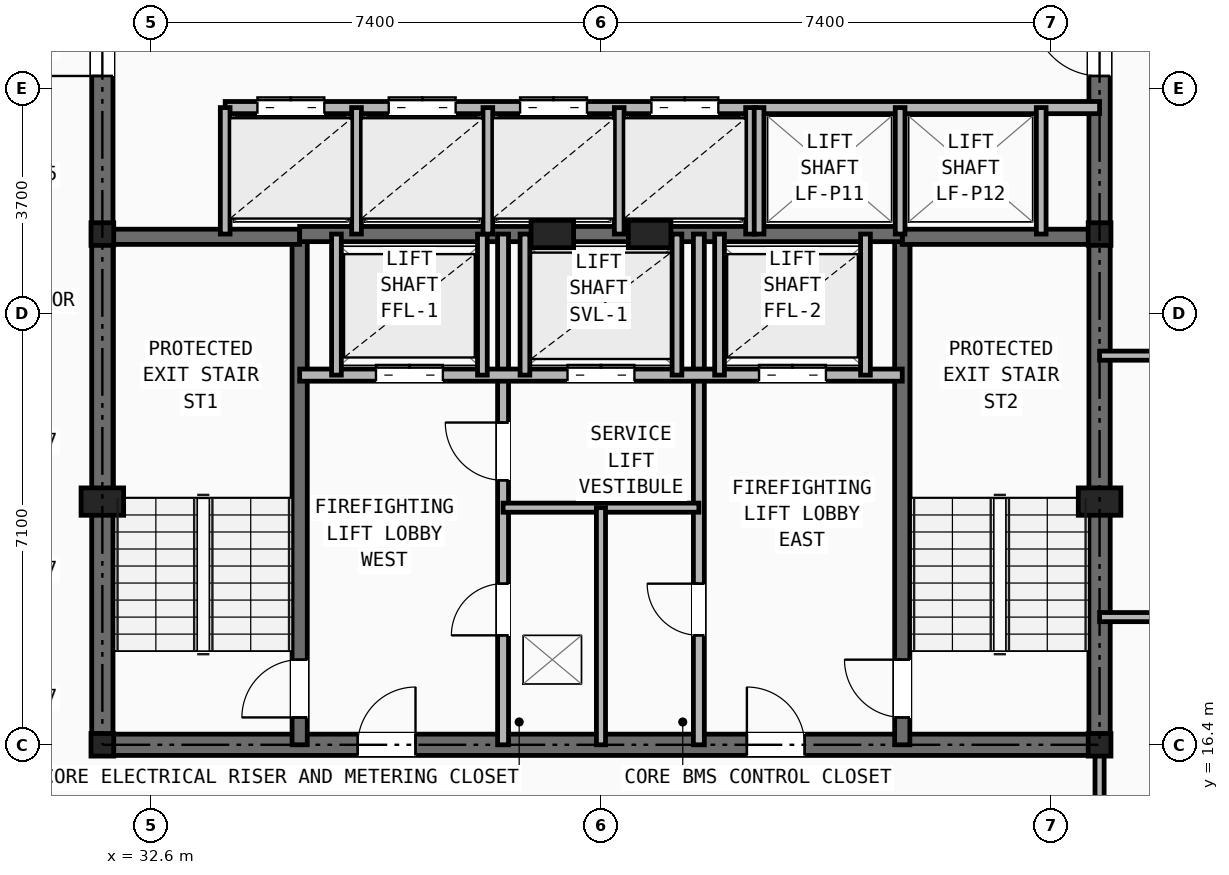
"""IFC4 building model, lengths in metres.
Left out: names, types, materials, properties, quantities, classifications, styles, units other than length and angle.
Written with IfcOpenShell. Run it as: python <this file> out.ifc"""

import sys

from ifc_helpers import new_model, si_unit, direction, frame, frame_2d, origin, origin_2d, place, context, subcontext, project, spatial, rectangle, i_section, extrude, element, fill, save


model = new_model("IFC4")
c1 = context("Model", 3, precision=1e-05, world=origin(), true_north=direction((0.0, 1.0)))
c2 = subcontext(c1, "Body", "Model", "MODEL_VIEW")
j1 = project(units=[si_unit("LENGTHUNIT", "METRE"), si_unit("PLANEANGLEUNIT", "RADIAN")], contexts=[c1])
p1 = place(None, origin())
s1 = spatial("IfcSite", under=j1, at=p1, CompositionType="ELEMENT")
p2 = place(p1, origin())
s2 = spatial("IfcBuilding", under=s1, at=p2, CompositionType="ELEMENT")
p3 = place(p2, frame((0.0, 0.0, 162.0)))
s3 = spatial("IfcBuildingStorey", under=s2, at=p3, CompositionType="ELEMENT", Elevation=162.0)
for number, where, z_axis, x_axis in (
    (1, (31.8, 16.4, 0.0), (0.0, 0.0, 1.0), (1.0, 0.0, 0.0)),
    (2, (48.2, 16.4, 0.0), (0.0, 0.0, 1.0), (1.0, 0.0, 0.0)),
    (3, (31.8, 24.8, 0.0), (0.0, 0.0, 1.0), (1.0, 0.0, 0.0)),
    (4, (48.2, 24.8, 0.0), (0.0, 0.0, 1.0), (1.0, 0.0, 0.0)),
):
    element("IfcColumn", number, at=place(p3, frame(where, z_axis=z_axis, x_axis=x_axis)), inside=s3, PredefinedType="COLUMN", context=c2, shape_type="SweptSolid", body=[
        extrude(i_section(OverallWidth=0.374, OverallDepth=0.372, WebThickness=0.016, FlangeThickness=0.026, at=origin_2d()), origin(), (0.0, 0.0, 1.0), 3.45),
    ])
for number, where, z_axis, x_axis in (
    (5, (31.8, 20.4, 0.0), (0.0, 0.0, 1.0), (1.0, 0.0, 0.0)),
    (6, (48.2, 20.4, 0.0), (0.0, 0.0, 1.0), (1.0, 0.0, 0.0)),
    (7, (39.2, 24.8, 0.0), (0.0, 0.0, 1.0), (1.0, 0.0, 0.0)),
    (8, (40.8, 24.8, 0.0), (0.0, 0.0, 1.0), (1.0, 0.0, 0.0)),
):
    element("IfcColumn", number, at=place(p3, frame(where, z_axis=z_axis, x_axis=x_axis)), inside=s3, PredefinedType="PILASTER", context=c2, shape_type="SweptSolid", body=[
        extrude(rectangle(XDim=0.7, YDim=0.45, at=origin_2d()), origin(), (0.0, 0.0, 1.0), 3.45),
    ])
p4 = place(p3, frame((31.8, 16.4, 0.0), z_axis=(0.0, 0.0, 1.0), x_axis=(1.0, 0.0, 0.0)))
e9 = element("IfcWall", 9, at=p4, inside=s3, PredefinedType="SHEAR", context=c2, shape_type="SweptSolid", body=[
    extrude(rectangle(XDim=16.4, YDim=0.35, at=frame_2d((8.2, 0.0))), origin(), (0.0, 0.0, 1.0), 3.21),
])
p5 = place(p4, frame((4.2, 0.0, 0.0)))
e10 = element("IfcOpeningElement", 10, at=p5, cuts=e9, PredefinedType="OPENING", context=c2, shape_type="SweptSolid", body=[
    extrude(rectangle(XDim=0.95, YDim=2.1, at=frame_2d((0.475, 1.05))), frame((0.0, 0.185, 0.0), z_axis=(0.0, -1.0, 0.0), x_axis=(1.0, 0.0, 0.0)), (0.0, 0.0, 1.0), 0.37),
])
p6 = place(p4, frame((10.6, 0.0, 0.0)))
e11 = element("IfcOpeningElement", 11, at=p6, cuts=e9, PredefinedType="OPENING", context=c2, shape_type="SweptSolid", body=[
    extrude(rectangle(XDim=0.95, YDim=2.1, at=frame_2d((0.475, 1.05))), frame((0.0, 0.185, 0.0), z_axis=(0.0, -1.0, 0.0), x_axis=(1.0, 0.0, 0.0)), (0.0, 0.0, 1.0), 0.37),
])
p7 = place(p3, frame((31.8, 16.4, 0.0), z_axis=(0.0, 0.0, 1.0), x_axis=(0.0, 1.0, 0.0)))
e12 = element("IfcWall", 12, at=p7, inside=s3, PredefinedType="SHEAR", context=c2, shape_type="SweptSolid", body=[
    extrude(rectangle(XDim=14.8, YDim=0.35, at=frame_2d((7.4, 0.0))), origin(), (0.0, 0.0, 1.0), 3.21),
])
p8 = place(p7, frame((11.0, 0.0, 0.0)))
e13 = element("IfcOpeningElement", 13, at=p8, cuts=e12, PredefinedType="OPENING", context=c2, shape_type="SweptSolid", body=[
    extrude(rectangle(XDim=1.1, YDim=2.15, at=frame_2d((0.55, 1.075))), frame((0.0, 0.185, 0.0), z_axis=(0.0, -1.0, 0.0), x_axis=(1.0, 0.0, 0.0)), (0.0, 0.0, 1.0), 0.37),
])
p9 = place(p3, frame((48.2, 16.4, 0.0), z_axis=(0.0, 0.0, 1.0), x_axis=(0.0, 1.0, 0.0)))
e14 = element("IfcWall", 14, at=p9, inside=s3, PredefinedType="SHEAR", context=c2, shape_type="SweptSolid", body=[
    extrude(rectangle(XDim=14.8, YDim=0.35, at=frame_2d((7.4, 0.0))), origin(), (0.0, 0.0, 1.0), 3.21),
])
p10 = place(p9, frame((11.0, 0.0, 0.0)))
e15 = element("IfcOpeningElement", 15, at=p10, cuts=e14, PredefinedType="OPENING", context=c2, shape_type="SweptSolid", body=[
    extrude(rectangle(XDim=1.1, YDim=2.15, at=frame_2d((0.55, 1.075))), frame((0.0, 0.185, 0.0), z_axis=(0.0, -1.0, 0.0), x_axis=(1.0, 0.0, 0.0)), (0.0, 0.0, 1.0), 0.37),
])
p11 = place(p3, frame((35.045, 16.4, 0.0), z_axis=(0.0, 0.0, 1.0), x_axis=(0.0, 1.0, 0.0)))
e16 = element("IfcWall", 16, at=p11, inside=s3, PredefinedType="SHEAR", context=c2, shape_type="SweptSolid", body=[
    extrude(rectangle(XDim=8.4, YDim=0.25, at=frame_2d((4.2, 0.0))), origin(), (0.0, 0.0, 1.0), 3.21),
])
p12 = place(p11, frame((0.45, 0.0, 0.0)))
e17 = element("IfcOpeningElement", 17, at=p12, cuts=e16, PredefinedType="OPENING", context=c2, shape_type="SweptSolid", body=[
    extrude(rectangle(XDim=0.95, YDim=2.1, at=frame_2d((0.475, 1.05))), frame((0.0, 0.135, 0.0), z_axis=(0.0, -1.0, 0.0), x_axis=(1.0, 0.0, 0.0)), (0.0, 0.0, 1.0), 0.27),
])
p13 = place(p3, frame((31.8, 24.755, 0.0), z_axis=(0.0, 0.0, 1.0), x_axis=(1.0, 0.0, 0.0)))
e18 = element("IfcWall", 18, at=p13, inside=s3, PredefinedType="SHEAR", context=c2, shape_type="SweptSolid", body=[
    extrude(rectangle(XDim=3.245, YDim=0.25, at=frame_2d((1.623, 0.0))), origin(), (0.0, 0.0, 1.0), 3.21),
])
p14 = place(p3, frame((44.955, 16.4, 0.0), z_axis=(0.0, 0.0, 1.0), x_axis=(0.0, 1.0, 0.0)))
e19 = element("IfcWall", 19, at=p14, inside=s3, PredefinedType="SHEAR", context=c2, shape_type="SweptSolid", body=[
    extrude(rectangle(XDim=8.4, YDim=0.25, at=frame_2d((4.2, 0.0))), origin(), (0.0, 0.0, 1.0), 3.21),
])
p15 = place(p14, frame((0.45, 0.0, 0.0)))
e20 = element("IfcOpeningElement", 20, at=p15, cuts=e19, PredefinedType="OPENING", context=c2, shape_type="SweptSolid", body=[
    extrude(rectangle(XDim=0.95, YDim=2.1, at=frame_2d((0.475, 1.05))), frame((0.0, 0.135, 0.0), z_axis=(0.0, -1.0, 0.0), x_axis=(1.0, 0.0, 0.0)), (0.0, 0.0, 1.0), 0.27),
])
p16 = place(p3, frame((44.955, 24.755, 0.0), z_axis=(0.0, 0.0, 1.0), x_axis=(1.0, 0.0, 0.0)))
e21 = element("IfcWall", 21, at=p16, inside=s3, PredefinedType="SHEAR", context=c2, shape_type="SweptSolid", body=[
    extrude(rectangle(XDim=3.245, YDim=0.25, at=frame_2d((1.623, 0.0))), origin(), (0.0, 0.0, 1.0), 3.21),
])
p17 = place(p3, frame((35.045, 24.8, 0.0), z_axis=(0.0, 0.0, 1.0), x_axis=(1.0, 0.0, 0.0)))
e22 = element("IfcWall", 22, at=p17, inside=s3, PredefinedType="SHEAR", context=c2, shape_type="SweptSolid", body=[
    extrude(rectangle(XDim=9.91, YDim=0.25, at=frame_2d((4.955, 0.0))), origin(), (0.0, 0.0, 1.0), 3.21),
])
p18 = place(p3, frame((38.39, 16.4, 0.0), z_axis=(0.0, 0.0, 1.0), x_axis=(0.0, 1.0, 0.0)))
e23 = element("IfcWall", 23, at=p18, inside=s3, PredefinedType="PARTITIONING", context=c2, shape_type="SweptSolid", body=[
    extrude(rectangle(XDim=8.4, YDim=0.18, at=frame_2d((4.2, 0.0))), origin(), (0.0, 0.0, 1.0), 2.665),
])
p19 = place(p18, frame((1.8, 0.0, 0.0)))
e24 = element("IfcOpeningElement", 24, at=p19, cuts=e23, PredefinedType="OPENING", context=c2, shape_type="SweptSolid", body=[
    extrude(rectangle(XDim=0.85, YDim=2.05, at=frame_2d((0.425, 1.025))), frame((0.0, 0.1, 0.0), z_axis=(0.0, -1.0, 0.0), x_axis=(1.0, 0.0, 0.0)), (0.0, 0.0, 1.0), 0.2),
])
p20 = place(p18, frame((4.35, 0.0, 0.0)))
e25 = element("IfcOpeningElement", 25, at=p20, cuts=e23, PredefinedType="OPENING", context=c2, shape_type="SweptSolid", body=[
    extrude(rectangle(XDim=0.95, YDim=2.1, at=frame_2d((0.475, 1.05))), frame((0.0, 0.1, 0.0), z_axis=(0.0, -1.0, 0.0), x_axis=(1.0, 0.0, 0.0)), (0.0, 0.0, 1.0), 0.2),
])
p21 = place(p3, frame((41.61, 16.4, 0.0), z_axis=(0.0, 0.0, 1.0), x_axis=(0.0, 1.0, 0.0)))
e26 = element("IfcWall", 26, at=p21, inside=s3, PredefinedType="PARTITIONING", context=c2, shape_type="SweptSolid", body=[
    extrude(rectangle(XDim=8.4, YDim=0.18, at=frame_2d((4.2, 0.0))), origin(), (0.0, 0.0, 1.0), 2.665),
])
p22 = place(p21, frame((1.8, 0.0, 0.0)))
e27 = element("IfcOpeningElement", 27, at=p22, cuts=e26, PredefinedType="OPENING", context=c2, shape_type="SweptSolid", body=[
    extrude(rectangle(XDim=0.85, YDim=2.05, at=frame_2d((0.425, 1.025))), frame((0.0, 0.1, 0.0), z_axis=(0.0, -1.0, 0.0), x_axis=(1.0, 0.0, 0.0)), (0.0, 0.0, 1.0), 0.2),
])
p23 = place(p3, frame((35.045, 22.48, 0.0), z_axis=(0.0, 0.0, 1.0), x_axis=(1.0, 0.0, 0.0)))
e28 = element("IfcWall", 28, at=p23, inside=s3, PredefinedType="SOLIDWALL", context=c2, shape_type="SweptSolid", body=[
    extrude(rectangle(XDim=9.91, YDim=0.2, at=frame_2d((4.955, 0.0))), origin(), (0.0, 0.0, 1.0), 3.21),
])
p24 = place(p23, frame((1.255, 0.0, 0.0)))
e29 = element("IfcOpeningElement", 29, at=p24, cuts=e28, PredefinedType="OPENING", context=c2, shape_type="SweptSolid", body=[
    extrude(rectangle(XDim=1.1, YDim=2.15, at=frame_2d((0.55, 1.075))), frame((0.0, 0.11, 0.0), z_axis=(0.0, -1.0, 0.0), x_axis=(1.0, 0.0, 0.0)), (0.0, 0.0, 1.0), 0.22),
])
p25 = place(p23, frame((7.555, 0.0, 0.0)))
e30 = element("IfcOpeningElement", 30, at=p25, cuts=e28, PredefinedType="OPENING", context=c2, shape_type="SweptSolid", body=[
    extrude(rectangle(XDim=1.1, YDim=2.15, at=frame_2d((0.55, 1.075))), frame((0.0, 0.11, 0.0), z_axis=(0.0, -1.0, 0.0), x_axis=(1.0, 0.0, 0.0)), (0.0, 0.0, 1.0), 0.22),
])
p26 = place(p23, frame((4.405, 0.0, 0.0)))
e31 = element("IfcOpeningElement", 31, at=p26, cuts=e28, PredefinedType="OPENING", context=c2, shape_type="SweptSolid", body=[
    extrude(rectangle(XDim=1.1, YDim=2.15, at=frame_2d((0.55, 1.075))), frame((0.0, 0.11, 0.0), z_axis=(0.0, -1.0, 0.0), x_axis=(1.0, 0.0, 0.0)), (0.0, 0.0, 1.0), 0.22),
])
p27 = place(p3, frame((38.39, 20.3, 0.0), z_axis=(0.0, 0.0, 1.0), x_axis=(1.0, 0.0, 0.0)))
e32 = element("IfcWall", 32, at=p27, inside=s3, PredefinedType="PARTITIONING", context=c2, shape_type="SweptSolid", body=[
    extrude(rectangle(XDim=3.22, YDim=0.15, at=frame_2d((1.61, 0.0))), origin(), (0.0, 0.0, 1.0), 3.21),
])
p28 = place(p3, frame((40.0, 16.4, 0.0), z_axis=(0.0, 0.0, 1.0), x_axis=(0.0, 1.0, 0.0)))
e33 = element("IfcWall", 33, at=p28, inside=s3, PredefinedType="PARTITIONING", context=c2, shape_type="SweptSolid", body=[
    extrude(rectangle(XDim=3.9, YDim=0.15, at=frame_2d((1.95, 0.0))), origin(), (0.0, 0.0, 1.0), 2.665),
])
for number, where, z_axis, x_axis in (
    (34, (35.65, 22.48, 0.0), (0.0, 0.0, 1.0), (0.0, 1.0, 0.0)),
    (35, (38.05, 22.48, 0.0), (0.0, 0.0, 1.0), (0.0, 1.0, 0.0)),
    (36, (41.95, 22.48, 0.0), (0.0, 0.0, 1.0), (0.0, 1.0, 0.0)),
    (37, (44.35, 22.48, 0.0), (0.0, 0.0, 1.0), (0.0, 1.0, 0.0)),
    (38, (38.75, 22.48, 0.0), (0.0, 0.0, 1.0), (0.0, 1.0, 0.0)),
    (39, (41.25, 22.48, 0.0), (0.0, 0.0, 1.0), (0.0, 1.0, 0.0)),
):
    element("IfcWall", number, at=place(p3, frame(where, z_axis=z_axis, x_axis=x_axis)), inside=s3, PredefinedType="SOLIDWALL", context=c2, shape_type="SweptSolid", body=[
        extrude(rectangle(XDim=2.32, YDim=0.16, at=frame_2d((1.16, 0.0))), origin(), (0.0, 0.0, 1.0), 3.21),
    ])
p29 = place(p3, frame((33.82, 26.88, 0.0), z_axis=(0.0, 0.0, 1.0), x_axis=(1.0, 0.0, 0.0)))
e40 = element("IfcWall", 40, at=p29, inside=s3, PredefinedType="SOLIDWALL", context=c2, shape_type="SweptSolid", body=[
    extrude(rectangle(XDim=14.38, YDim=0.2, at=frame_2d((7.19, 0.0))), origin(), (0.0, 0.0, 1.0), 2.665),
])
p30 = place(p29, frame((0.53, 0.0, 0.0)))
e41 = element("IfcOpeningElement", 41, at=p30, cuts=e40, PredefinedType="OPENING", context=c2, shape_type="SweptSolid", body=[
    extrude(rectangle(XDim=1.1, YDim=2.15, at=frame_2d((0.55, 1.075))), frame((0.0, 0.11, 0.0), z_axis=(0.0, -1.0, 0.0), x_axis=(1.0, 0.0, 0.0)), (0.0, 0.0, 1.0), 0.22),
])
p31 = place(p29, frame((2.69, 0.0, 0.0)))
e42 = element("IfcOpeningElement", 42, at=p31, cuts=e40, PredefinedType="OPENING", context=c2, shape_type="SweptSolid", body=[
    extrude(rectangle(XDim=1.1, YDim=2.15, at=frame_2d((0.55, 1.075))), frame((0.0, 0.11, 0.0), z_axis=(0.0, -1.0, 0.0), x_axis=(1.0, 0.0, 0.0)), (0.0, 0.0, 1.0), 0.22),
])
p32 = place(p29, frame((4.85, 0.0, 0.0)))
e43 = element("IfcOpeningElement", 43, at=p32, cuts=e40, PredefinedType="OPENING", context=c2, shape_type="SweptSolid", body=[
    extrude(rectangle(XDim=1.1, YDim=2.15, at=frame_2d((0.55, 1.075))), frame((0.0, 0.11, 0.0), z_axis=(0.0, -1.0, 0.0), x_axis=(1.0, 0.0, 0.0)), (0.0, 0.0, 1.0), 0.22),
])
p33 = place(p29, frame((7.01, 0.0, 0.0)))
e44 = element("IfcOpeningElement", 44, at=p33, cuts=e40, PredefinedType="OPENING", context=c2, shape_type="SweptSolid", body=[
    extrude(rectangle(XDim=1.1, YDim=2.15, at=frame_2d((0.55, 1.075))), frame((0.0, 0.11, 0.0), z_axis=(0.0, -1.0, 0.0), x_axis=(1.0, 0.0, 0.0)), (0.0, 0.0, 1.0), 0.22),
])
for number, where, z_axis, x_axis in (
    (45, (33.82, 24.8, 0.0), (0.0, 0.0, 1.0), (0.0, 1.0, 0.0)),
    (46, (35.98, 24.8, 0.0), (0.0, 0.0, 1.0), (0.0, 1.0, 0.0)),
    (47, (38.14, 24.8, 0.0), (0.0, 0.0, 1.0), (0.0, 1.0, 0.0)),
    (48, (40.3, 24.8, 0.0), (0.0, 0.0, 1.0), (0.0, 1.0, 0.0)),
    (49, (42.46, 24.8, 0.0), (0.0, 0.0, 1.0), (0.0, 1.0, 0.0)),
    (50, (42.6, 24.8, 0.0), (0.0, 0.0, 1.0), (0.0, 1.0, 0.0)),
    (51, (44.92, 24.8, 0.0), (0.0, 0.0, 1.0), (0.0, 1.0, 0.0)),
    (52, (47.24, 24.8, 0.0), (0.0, 0.0, 1.0), (0.0, 1.0, 0.0)),
):
    element("IfcWall", number, at=place(p3, frame(where, z_axis=z_axis, x_axis=x_axis)), inside=s3, PredefinedType="SOLIDWALL", context=c2, shape_type="SweptSolid", body=[
        extrude(rectangle(XDim=2.08, YDim=0.16, at=frame_2d((1.04, 0.0))), origin(), (0.0, 0.0, 1.0), 3.21),
    ])
p34 = place(p3, frame((48.2, 14.1, 0.0), z_axis=(0.0, 0.0, 1.0), x_axis=(0.0, 1.0, 0.0)))
e53 = element("IfcWall", 53, at=p34, inside=s3, PredefinedType="PARTITIONING", context=c2, shape_type="SweptSolid", body=[
    extrude(rectangle(XDim=2.3, YDim=0.15, at=frame_2d((1.15, 0.0))), origin(), (0.0, 0.0, 1.0), 2.665),
])
p35 = place(p3, frame((48.2, 18.5, 0.0), z_axis=(0.0, 0.0, 1.0), x_axis=(1.0, 0.0, 0.0)))
e54 = element("IfcWall", 54, at=p35, inside=s3, PredefinedType="PARTITIONING", context=c2, shape_type="SweptSolid", body=[
    extrude(rectangle(XDim=15.585, YDim=0.15, at=frame_2d((7.792, 0.0))), origin(), (0.0, 0.0, 1.0), 2.589),
])
p36 = place(p35, frame((1.4, 0.0, 0.0)))
e55 = element("IfcOpeningElement", 55, at=p36, cuts=e54, PredefinedType="OPENING", context=c2, shape_type="SweptSolid", body=[
    extrude(rectangle(XDim=0.95, YDim=2.1, at=frame_2d((0.475, 1.05))), frame((0.0, 0.085, 0.0), z_axis=(0.0, -1.0, 0.0), x_axis=(1.0, 0.0, 0.0)), (0.0, 0.0, 1.0), 0.17),
])
p37 = place(p3, frame((48.2, 22.8, 0.0), z_axis=(0.0, 0.0, 1.0), x_axis=(1.0, 0.0, 0.0)))
e56 = element("IfcWall", 56, at=p37, inside=s3, PredefinedType="PARTITIONING", context=c2, shape_type="SweptSolid", body=[
    extrude(rectangle(XDim=12.924, YDim=0.15, at=frame_2d((6.462, 0.0))), origin(), (0.0, 0.0, 1.0), 2.589),
])
p38 = place(p37, frame((1.4, 0.0, 0.0)))
e57 = element("IfcOpeningElement", 57, at=p38, cuts=e56, PredefinedType="OPENING", context=c2, shape_type="SweptSolid", body=[
    extrude(rectangle(XDim=0.95, YDim=2.1, at=frame_2d((0.475, 1.05))), frame((0.0, 0.085, 0.0), z_axis=(0.0, -1.0, 0.0), x_axis=(1.0, 0.0, 0.0)), (0.0, 0.0, 1.0), 0.17),
])
p39 = place(p19, origin())
e58 = element("IfcDoor", 58, at=p39, inside=s3, OperationType="SINGLE_SWING_LEFT", PredefinedType="DOOR", context=c2, shape_type="SweptSolid", body=[
    extrude(rectangle(XDim=0.85, YDim=2.05, at=frame_2d((0.425, 1.025))), frame((0.0, 0.025, 0.0), z_axis=(0.0, -1.0, 0.0), x_axis=(1.0, 0.0, 0.0)), (0.0, 0.0, 1.0), 0.05),
])
fill(e24, e58)
p40 = place(p22, origin())
e59 = element("IfcDoor", 59, at=p40, inside=s3, OperationType="SINGLE_SWING_RIGHT", PredefinedType="DOOR", context=c2, shape_type="SweptSolid", body=[
    extrude(rectangle(XDim=0.85, YDim=2.05, at=frame_2d((0.425, 1.025))), frame((0.0, 0.025, 0.0), z_axis=(0.0, -1.0, 0.0), x_axis=(1.0, 0.0, 0.0)), (0.0, 0.0, 1.0), 0.05),
])
fill(e27, e59)
p41 = place(p20, origin())
e60 = element("IfcDoor", 60, at=p41, inside=s3, OperationType="SINGLE_SWING_RIGHT", PredefinedType="DOOR", context=c2, shape_type="SweptSolid", body=[
    extrude(rectangle(XDim=0.95, YDim=2.1, at=frame_2d((0.475, 1.05))), frame((0.0, 0.025, 0.0), z_axis=(0.0, -1.0, 0.0), x_axis=(1.0, 0.0, 0.0)), (0.0, 0.0, 1.0), 0.05),
])
fill(e25, e60)
p42 = place(p12, origin())
e61 = element("IfcDoor", 61, at=p42, inside=s3, OperationType="SINGLE_SWING_LEFT", PredefinedType="DOOR", context=c2, shape_type="SweptSolid", body=[
    extrude(rectangle(XDim=0.95, YDim=2.1, at=frame_2d((0.475, 1.05))), frame((0.0, 0.025, 0.0), z_axis=(0.0, -1.0, 0.0), x_axis=(1.0, 0.0, 0.0)), (0.0, 0.0, 1.0), 0.05),
])
fill(e17, e61)
p43 = place(p15, origin())
e62 = element("IfcDoor", 62, at=p43, inside=s3, OperationType="SINGLE_SWING_RIGHT", PredefinedType="DOOR", context=c2, shape_type="SweptSolid", body=[
    extrude(rectangle(XDim=0.95, YDim=2.1, at=frame_2d((0.475, 1.05))), frame((0.0, 0.025, 0.0), z_axis=(0.0, -1.0, 0.0), x_axis=(1.0, 0.0, 0.0)), (0.0, 0.0, 1.0), 0.05),
])
fill(e20, e62)
p44 = place(p5, origin())
e63 = element("IfcDoor", 63, at=p44, inside=s3, OperationType="SINGLE_SWING_RIGHT", PredefinedType="DOOR", context=c2, shape_type="SweptSolid", body=[
    extrude(rectangle(XDim=0.95, YDim=2.1, at=frame_2d((0.475, 1.05))), frame((0.0, 0.025, 0.0), z_axis=(0.0, -1.0, 0.0), x_axis=(1.0, 0.0, 0.0)), (0.0, 0.0, 1.0), 0.05),
])
fill(e10, e63)
p45 = place(p6, origin())
e64 = element("IfcDoor", 64, at=p45, inside=s3, OperationType="SINGLE_SWING_LEFT", PredefinedType="DOOR", context=c2, shape_type="SweptSolid", body=[
    extrude(rectangle(XDim=0.95, YDim=2.1, at=frame_2d((0.475, 1.05))), frame((0.0, 0.025, 0.0), z_axis=(0.0, -1.0, 0.0), x_axis=(1.0, 0.0, 0.0)), (0.0, 0.0, 1.0), 0.05),
])
fill(e11, e64)
p46 = place(p24, origin())
e65 = element("IfcDoor", 65, at=p46, inside=s3, OperationType="DOUBLE_DOOR_SLIDING", PredefinedType="DOOR", context=c2, shape_type="SweptSolid", body=[
    extrude(rectangle(XDim=1.1, YDim=2.15, at=frame_2d((0.55, 1.075))), frame((0.0, 0.025, 0.0), z_axis=(0.0, -1.0, 0.0), x_axis=(1.0, 0.0, 0.0)), (0.0, 0.0, 1.0), 0.05),
])
fill(e29, e65)
p47 = place(p25, origin())
e66 = element("IfcDoor", 66, at=p47, inside=s3, OperationType="DOUBLE_DOOR_SLIDING", PredefinedType="DOOR", context=c2, shape_type="SweptSolid", body=[
    extrude(rectangle(XDim=1.1, YDim=2.15, at=frame_2d((0.55, 1.075))), frame((0.0, 0.025, 0.0), z_axis=(0.0, -1.0, 0.0), x_axis=(1.0, 0.0, 0.0)), (0.0, 0.0, 1.0), 0.05),
])
fill(e30, e66)
p48 = place(p26, origin())
e67 = element("IfcDoor", 67, at=p48, inside=s3, OperationType="DOUBLE_DOOR_SLIDING", PredefinedType="DOOR", context=c2, shape_type="SweptSolid", body=[
    extrude(rectangle(XDim=1.1, YDim=2.15, at=frame_2d((0.55, 1.075))), frame((0.0, 0.025, 0.0), z_axis=(0.0, -1.0, 0.0), x_axis=(1.0, 0.0, 0.0)), (0.0, 0.0, 1.0), 0.05),
])
fill(e31, e67)
p49 = place(p8, origin())
e68 = element("IfcDoor", 68, at=p49, inside=s3, OperationType="SINGLE_SWING_LEFT", PredefinedType="DOOR", context=c2, shape_type="SweptSolid", body=[
    extrude(rectangle(XDim=1.1, YDim=2.15, at=frame_2d((0.55, 1.075))), frame((0.0, 0.025, 0.0), z_axis=(0.0, -1.0, 0.0), x_axis=(1.0, 0.0, 0.0)), (0.0, 0.0, 1.0), 0.05),
])
fill(e13, e68)
p50 = place(p10, origin())
e69 = element("IfcDoor", 69, at=p50, inside=s3, OperationType="SINGLE_SWING_RIGHT", PredefinedType="DOOR", context=c2, shape_type="SweptSolid", body=[
    extrude(rectangle(XDim=1.1, YDim=2.15, at=frame_2d((0.55, 1.075))), frame((0.0, 0.025, 0.0), z_axis=(0.0, -1.0, 0.0), x_axis=(1.0, 0.0, 0.0)), (0.0, 0.0, 1.0), 0.05),
])
fill(e15, e69)
p51 = place(p30, origin())
e70 = element("IfcDoor", 70, at=p51, inside=s3, OperationType="DOUBLE_DOOR_SLIDING", PredefinedType="DOOR", context=c2, shape_type="SweptSolid", body=[
    extrude(rectangle(XDim=1.1, YDim=2.15, at=frame_2d((0.55, 1.075))), frame((0.0, 0.025, 0.0), z_axis=(0.0, -1.0, 0.0), x_axis=(1.0, 0.0, 0.0)), (0.0, 0.0, 1.0), 0.05),
])
fill(e41, e70)
p52 = place(p31, origin())
e71 = element("IfcDoor", 71, at=p52, inside=s3, OperationType="DOUBLE_DOOR_SLIDING", PredefinedType="DOOR", context=c2, shape_type="SweptSolid", body=[
    extrude(rectangle(XDim=1.1, YDim=2.15, at=frame_2d((0.55, 1.075))), frame((0.0, 0.025, 0.0), z_axis=(0.0, -1.0, 0.0), x_axis=(1.0, 0.0, 0.0)), (0.0, 0.0, 1.0), 0.05),
])
fill(e42, e71)
p53 = place(p32, origin())
e72 = element("IfcDoor", 72, at=p53, inside=s3, OperationType="DOUBLE_DOOR_SLIDING", PredefinedType="DOOR", context=c2, shape_type="SweptSolid", body=[
    extrude(rectangle(XDim=1.1, YDim=2.15, at=frame_2d((0.55, 1.075))), frame((0.0, 0.025, 0.0), z_axis=(0.0, -1.0, 0.0), x_axis=(1.0, 0.0, 0.0)), (0.0, 0.0, 1.0), 0.05),
])
fill(e43, e72)
p54 = place(p33, origin())
e73 = element("IfcDoor", 73, at=p54, inside=s3, OperationType="DOUBLE_DOOR_SLIDING", PredefinedType="DOOR", context=c2, shape_type="SweptSolid", body=[
    extrude(rectangle(XDim=1.1, YDim=2.15, at=frame_2d((0.55, 1.075))), frame((0.0, 0.025, 0.0), z_axis=(0.0, -1.0, 0.0), x_axis=(1.0, 0.0, 0.0)), (0.0, 0.0, 1.0), 0.05),
])
fill(e44, e73)
save(model, sys.argv[1])
